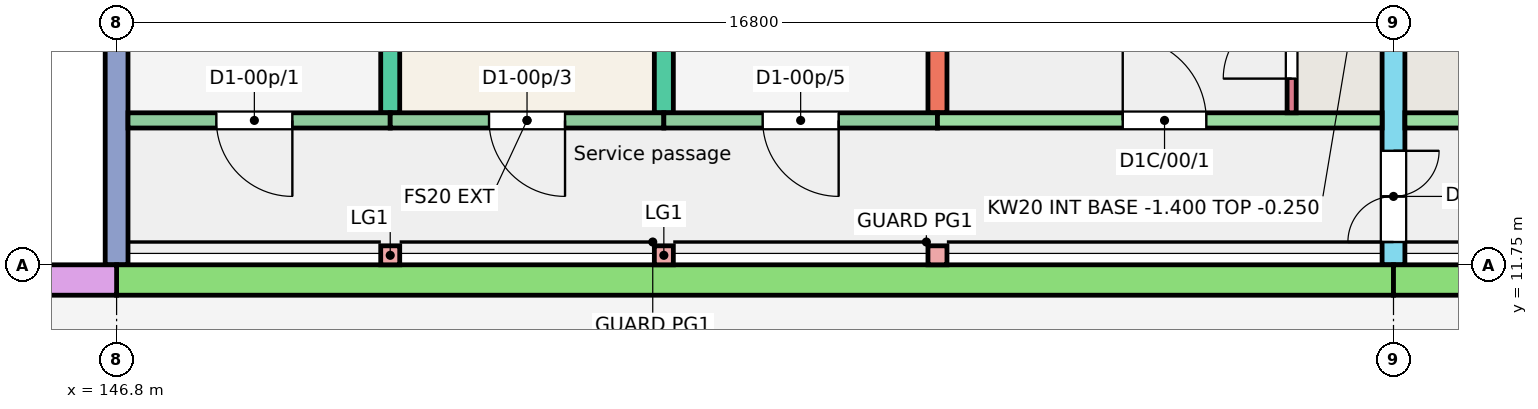
"""IFC4 building model, lengths in metres.
Left out: names, types, materials, properties, quantities, classifications, styles, units other than length and angle.
Written with IfcOpenShell. Run it as: python <this file> out.ifc"""

import sys

from ifc_helpers import new_model, si_unit, direction, frame, frame_2d, origin, origin_2d, place, context, subcontext, project, spatial, rectangle, extrude, element, fill, save


model = new_model("IFC4")
c1 = context("Model", 3, precision=1e-05, world=origin(), true_north=direction((0.0, 1.0)))
c2 = subcontext(c1, "Body", "Model", "MODEL_VIEW")
j1 = project(units=[si_unit("LENGTHUNIT", "METRE"), si_unit("PLANEANGLEUNIT", "RADIAN")], contexts=[c1])
p1 = place(None, origin())
s1 = spatial("IfcSite", under=j1, at=p1, CompositionType="ELEMENT")
p2 = place(p1, origin())
s2 = spatial("IfcBuilding", under=s1, at=p2, CompositionType="ELEMENT")
p3 = place(p2, origin())
s3 = spatial("IfcBuildingStorey", under=s2, at=p3, CompositionType="ELEMENT", Elevation=0.0)
p4 = place(p3, frame((146.8, 11.75, -0.25), z_axis=(0.0, 0.0, 1.0), x_axis=(0.0, 1.0, 0.0)))
e1 = element("IfcWall", 1, at=p4, inside=s3, PredefinedType="SHEAR", context=c2, shape_type="SweptSolid", body=[
    extrude(rectangle(XDim=11.0, YDim=0.3, at=frame_2d((5.5, 0.0))), origin(), (0.0, 0.0, 1.0), 3.25),
])
for number, where, z_axis, x_axis in (
    (2, (150.4, 13.75, -0.25), (0.0, 0.0, 1.0), (0.0, 1.0, 0.0)),
    (3, (154.0, 13.75, -0.25), (0.0, 0.0, 1.0), (0.0, 1.0, 0.0)),
    (4, (157.6, 13.75, -0.25), (0.0, 0.0, 1.0), (0.0, 1.0, 0.0)),
):
    element("IfcWall", number, at=place(p3, frame(where, z_axis=z_axis, x_axis=x_axis)), inside=s3, PredefinedType="SHEAR", context=c2, shape_type="SweptSolid", body=[
        extrude(rectangle(XDim=9.0, YDim=0.25, at=frame_2d((4.5, 0.0))), origin(), (0.0, 0.0, 1.0), 3.25),
    ])
p5 = place(p3, frame((163.6, 11.75, -0.25), z_axis=(0.0, 0.0, 1.0), x_axis=(0.0, 1.0, 0.0)))
e5 = element("IfcWall", 5, at=p5, inside=s3, PredefinedType="SHEAR", context=c2, shape_type="SweptSolid", body=[
    extrude(rectangle(XDim=11.0, YDim=0.3, at=frame_2d((5.5, 0.0))), origin(), (0.0, 0.0, 1.0), 3.25),
])
p6 = place(p5, frame((0.3, 0.0, 0.25)))
e6 = element("IfcOpeningElement", 6, at=p6, cuts=e5, PredefinedType="OPENING", context=c2, shape_type="SweptSolid", body=[
    extrude(rectangle(XDim=1.2, YDim=2.1, at=frame_2d((0.6, 1.05))), frame((0.0, 0.16, 0.0), z_axis=(0.0, -1.0, 0.0), x_axis=(1.0, 0.0, 0.0)), (0.0, 0.0, 1.0), 0.32),
])
p7 = place(p3, frame((146.95, 13.65, -0.25), z_axis=(0.0, 0.0, 1.0), x_axis=(1.0, 0.0, 0.0)))
e7 = element("IfcWall", 7, at=p7, inside=s3, PredefinedType="SOLIDWALL", context=c2, shape_type="SweptSolid", body=[
    extrude(rectangle(XDim=3.45, YDim=0.2, at=frame_2d((1.725, 0.0))), origin(), (0.0, 0.0, 1.0), 3.25),
])
p8 = place(p7, frame((1.163, 0.0, 0.25)))
e8 = element("IfcOpeningElement", 8, at=p8, cuts=e7, PredefinedType="OPENING", context=c2, shape_type="SweptSolid", body=[
    extrude(rectangle(XDim=1.0, YDim=2.1, at=frame_2d((0.5, 1.05))), frame((0.0, 0.11, 0.0), z_axis=(0.0, -1.0, 0.0), x_axis=(1.0, 0.0, 0.0)), (0.0, 0.0, 1.0), 0.22),
])
p9 = place(p3, frame((150.4, 13.65, -0.25), z_axis=(0.0, 0.0, 1.0), x_axis=(1.0, 0.0, 0.0)))
e9 = element("IfcWall", 9, at=p9, inside=s3, PredefinedType="SOLIDWALL", context=c2, shape_type="SweptSolid", body=[
    extrude(rectangle(XDim=3.6, YDim=0.2, at=frame_2d((1.8, 0.0))), origin(), (0.0, 0.0, 1.0), 3.25),
])
p10 = place(p9, frame((1.3, 0.0, 0.25)))
e10 = element("IfcOpeningElement", 10, at=p10, cuts=e9, PredefinedType="OPENING", context=c2, shape_type="SweptSolid", body=[
    extrude(rectangle(XDim=1.0, YDim=2.1, at=frame_2d((0.5, 1.05))), frame((0.0, 0.11, 0.0), z_axis=(0.0, -1.0, 0.0), x_axis=(1.0, 0.0, 0.0)), (0.0, 0.0, 1.0), 0.22),
])
p11 = place(p3, frame((154.0, 13.65, -0.25), z_axis=(0.0, 0.0, 1.0), x_axis=(1.0, 0.0, 0.0)))
e11 = element("IfcWall", 11, at=p11, inside=s3, PredefinedType="SOLIDWALL", context=c2, shape_type="SweptSolid", body=[
    extrude(rectangle(XDim=3.6, YDim=0.2, at=frame_2d((1.8, 0.0))), origin(), (0.0, 0.0, 1.0), 3.25),
])
p12 = place(p11, frame((1.3, 0.0, 0.25)))
e12 = element("IfcOpeningElement", 12, at=p12, cuts=e11, PredefinedType="OPENING", context=c2, shape_type="SweptSolid", body=[
    extrude(rectangle(XDim=1.0, YDim=2.1, at=frame_2d((0.5, 1.05))), frame((0.0, 0.11, 0.0), z_axis=(0.0, -1.0, 0.0), x_axis=(1.0, 0.0, 0.0)), (0.0, 0.0, 1.0), 0.22),
])
p13 = place(p3, frame((157.6, 13.65, -0.25), z_axis=(0.0, 0.0, 1.0), x_axis=(1.0, 0.0, 0.0)))
e13 = element("IfcWall", 13, at=p13, inside=s3, PredefinedType="SHEAR", context=c2, shape_type="SweptSolid", body=[
    extrude(rectangle(XDim=5.85, YDim=0.2, at=frame_2d((2.925, 0.0))), origin(), (0.0, 0.0, 1.0), 3.25),
])
p14 = place(p13, frame((2.438, 0.0, 0.25)))
e14 = element("IfcOpeningElement", 14, at=p14, cuts=e13, PredefinedType="OPENING", context=c2, shape_type="SweptSolid", body=[
    extrude(rectangle(XDim=1.1, YDim=2.1, at=frame_2d((0.55, 1.05))), frame((0.0, 0.11, 0.0), z_axis=(0.0, -1.0, 0.0), x_axis=(1.0, 0.0, 0.0)), (0.0, 0.0, 1.0), 0.22),
])
p15 = place(p3, frame((162.26, 13.75, -0.25), z_axis=(0.0, 0.0, 1.0), x_axis=(0.0, 1.0, 0.0)))
e15 = element("IfcWall", 15, at=p15, inside=s3, PredefinedType="SHEAR", context=c2, shape_type="SweptSolid", body=[
    extrude(rectangle(XDim=1.72, YDim=0.12, at=frame_2d((0.86, 0.0))), origin(), (0.0, 0.0, 1.0), 3.25),
])
p16 = place(p15, frame((0.45, 0.0, 0.25)))
e16 = element("IfcOpeningElement", 16, at=p16, cuts=e15, PredefinedType="OPENING", context=c2, shape_type="SweptSolid", body=[
    extrude(rectangle(XDim=0.9, YDim=2.1, at=frame_2d((0.45, 1.05))), frame((0.0, 0.07, 0.0), z_axis=(0.0, -1.0, 0.0), x_axis=(1.0, 0.0, 0.0)), (0.0, 0.0, 1.0), 0.14),
])
p17 = place(p3, frame((163.75, 13.65, -0.25), z_axis=(0.0, 0.0, 1.0), x_axis=(1.0, 0.0, 0.0)))
e17 = element("IfcWall", 17, at=p17, inside=s3, PredefinedType="SHEAR", context=c2, shape_type="SweptSolid", body=[
    extrude(rectangle(XDim=5.85, YDim=0.2, at=frame_2d((2.925, 0.0))), origin(), (0.0, 0.0, 1.0), 3.25),
])
p18 = place(p17, frame((2.312, 0.0, 0.25)))
e18 = element("IfcOpeningElement", 18, at=p18, cuts=e17, PredefinedType="OPENING", context=c2, shape_type="SweptSolid", body=[
    extrude(rectangle(XDim=1.1, YDim=2.1, at=frame_2d((0.55, 1.05))), frame((0.0, 0.11, 0.0), z_axis=(0.0, -1.0, 0.0), x_axis=(1.0, 0.0, 0.0)), (0.0, 0.0, 1.0), 0.22),
])
for number, where, z_axis, x_axis in (
    (19, (150.4, 11.875, -0.25), (0.0, 0.0, 1.0), (1.0, 0.0, 0.0)),
    (20, (154.0, 11.875, -0.25), (0.0, 0.0, 1.0), (1.0, 0.0, 0.0)),
    (21, (157.6, 11.875, -0.25), (0.0, 0.0, 1.0), (1.0, 0.0, 0.0)),
):
    element("IfcColumn", number, at=place(p3, frame(where, z_axis=z_axis, x_axis=x_axis)), inside=s3, PredefinedType="COLUMN", context=c2, shape_type="SweptSolid", body=[
        extrude(rectangle(XDim=0.25, YDim=0.25, at=origin_2d()), origin(), (0.0, 0.0, 1.0), 3.25),
    ])
p19 = place(p3, frame((146.8, 11.55, -0.25), z_axis=(0.0, 0.0, 1.0), x_axis=(1.0, 0.0, 0.0)))
e22 = element("IfcWall", 22, at=p19, inside=s3, PredefinedType="SOLIDWALL", context=c2, shape_type="SweptSolid", body=[
    extrude(rectangle(XDim=16.8, YDim=0.4, at=frame_2d((8.4, 0.0))), origin(), (0.0, 0.0, 1.0), 3.25),
])
p20 = place(p3, frame((163.6, 11.55, -0.25), z_axis=(0.0, 0.0, 1.0), x_axis=(1.0, 0.0, 0.0)))
e23 = element("IfcWall", 23, at=p20, inside=s3, PredefinedType="SOLIDWALL", context=c2, shape_type="SweptSolid", body=[
    extrude(rectangle(XDim=16.8, YDim=0.4, at=frame_2d((8.4, 0.0))), origin(), (0.0, 0.0, 1.0), 3.25),
])
p21 = place(p3, frame((132.8, 11.55, -0.25), z_axis=(0.0, 0.0, 1.0), x_axis=(1.0, 0.0, 0.0)))
e24 = element("IfcWall", 24, at=p21, inside=s3, PredefinedType="SOLIDWALL", context=c2, shape_type="SweptSolid", body=[
    extrude(rectangle(XDim=14.0, YDim=0.4, at=frame_2d((7.0, 0.0))), origin(), (0.0, 0.0, 1.0), 6.25),
])
p22 = place(p8, origin())
e25 = element("IfcDoor", 25, at=p22, inside=s3, OperationType="SINGLE_SWING_RIGHT", PredefinedType="DOOR", context=c2, shape_type="SweptSolid", body=[
    extrude(rectangle(XDim=1.0, YDim=2.1, at=frame_2d((0.5, 1.05))), frame((0.0, 0.025, 0.0), z_axis=(0.0, -1.0, 0.0), x_axis=(1.0, 0.0, 0.0)), (0.0, 0.0, 1.0), 0.05),
])
fill(e8, e25)
p23 = place(p10, origin())
e26 = element("IfcDoor", 26, at=p23, inside=s3, OperationType="SINGLE_SWING_RIGHT", PredefinedType="DOOR", context=c2, shape_type="SweptSolid", body=[
    extrude(rectangle(XDim=1.0, YDim=2.1, at=frame_2d((0.5, 1.05))), frame((0.0, 0.025, 0.0), z_axis=(0.0, -1.0, 0.0), x_axis=(1.0, 0.0, 0.0)), (0.0, 0.0, 1.0), 0.05),
])
fill(e10, e26)
p24 = place(p12, origin())
e27 = element("IfcDoor", 27, at=p24, inside=s3, OperationType="SINGLE_SWING_RIGHT", PredefinedType="DOOR", context=c2, shape_type="SweptSolid", body=[
    extrude(rectangle(XDim=1.0, YDim=2.1, at=frame_2d((0.5, 1.05))), frame((0.0, 0.025, 0.0), z_axis=(0.0, -1.0, 0.0), x_axis=(1.0, 0.0, 0.0)), (0.0, 0.0, 1.0), 0.05),
])
fill(e12, e27)
p25 = place(p14, origin())
e28 = element("IfcDoor", 28, at=p25, inside=s3, OperationType="SINGLE_SWING_LEFT", PredefinedType="DOOR", context=c2, shape_type="SweptSolid", body=[
    extrude(rectangle(XDim=1.1, YDim=2.1, at=frame_2d((0.55, 1.05))), frame((0.0, 0.025, 0.0), z_axis=(0.0, -1.0, 0.0), x_axis=(1.0, 0.0, 0.0)), (0.0, 0.0, 1.0), 0.05),
])
fill(e14, e28)
p26 = place(p16, origin())
e29 = element("IfcDoor", 29, at=p26, inside=s3, OperationType="SINGLE_SWING_LEFT", PredefinedType="DOOR", context=c2, shape_type="SweptSolid", body=[
    extrude(rectangle(XDim=0.9, YDim=2.1, at=frame_2d((0.45, 1.05))), frame((0.0, 0.025, 0.0), z_axis=(0.0, -1.0, 0.0), x_axis=(1.0, 0.0, 0.0)), (0.0, 0.0, 1.0), 0.05),
])
fill(e16, e29)
p27 = place(p6, origin())
e30 = element("IfcDoor", 30, at=p27, inside=s3, OperationType="DOUBLE_DOOR_SINGLE_SWING", PredefinedType="DOOR", context=c2, shape_type="SweptSolid", body=[
    extrude(rectangle(XDim=1.2, YDim=2.1, at=frame_2d((0.6, 1.05))), frame((0.0, 0.025, 0.0), z_axis=(0.0, -1.0, 0.0), x_axis=(1.0, 0.0, 0.0)), (0.0, 0.0, 1.0), 0.05),
])
fill(e6, e30)
save(model, sys.argv[1])
